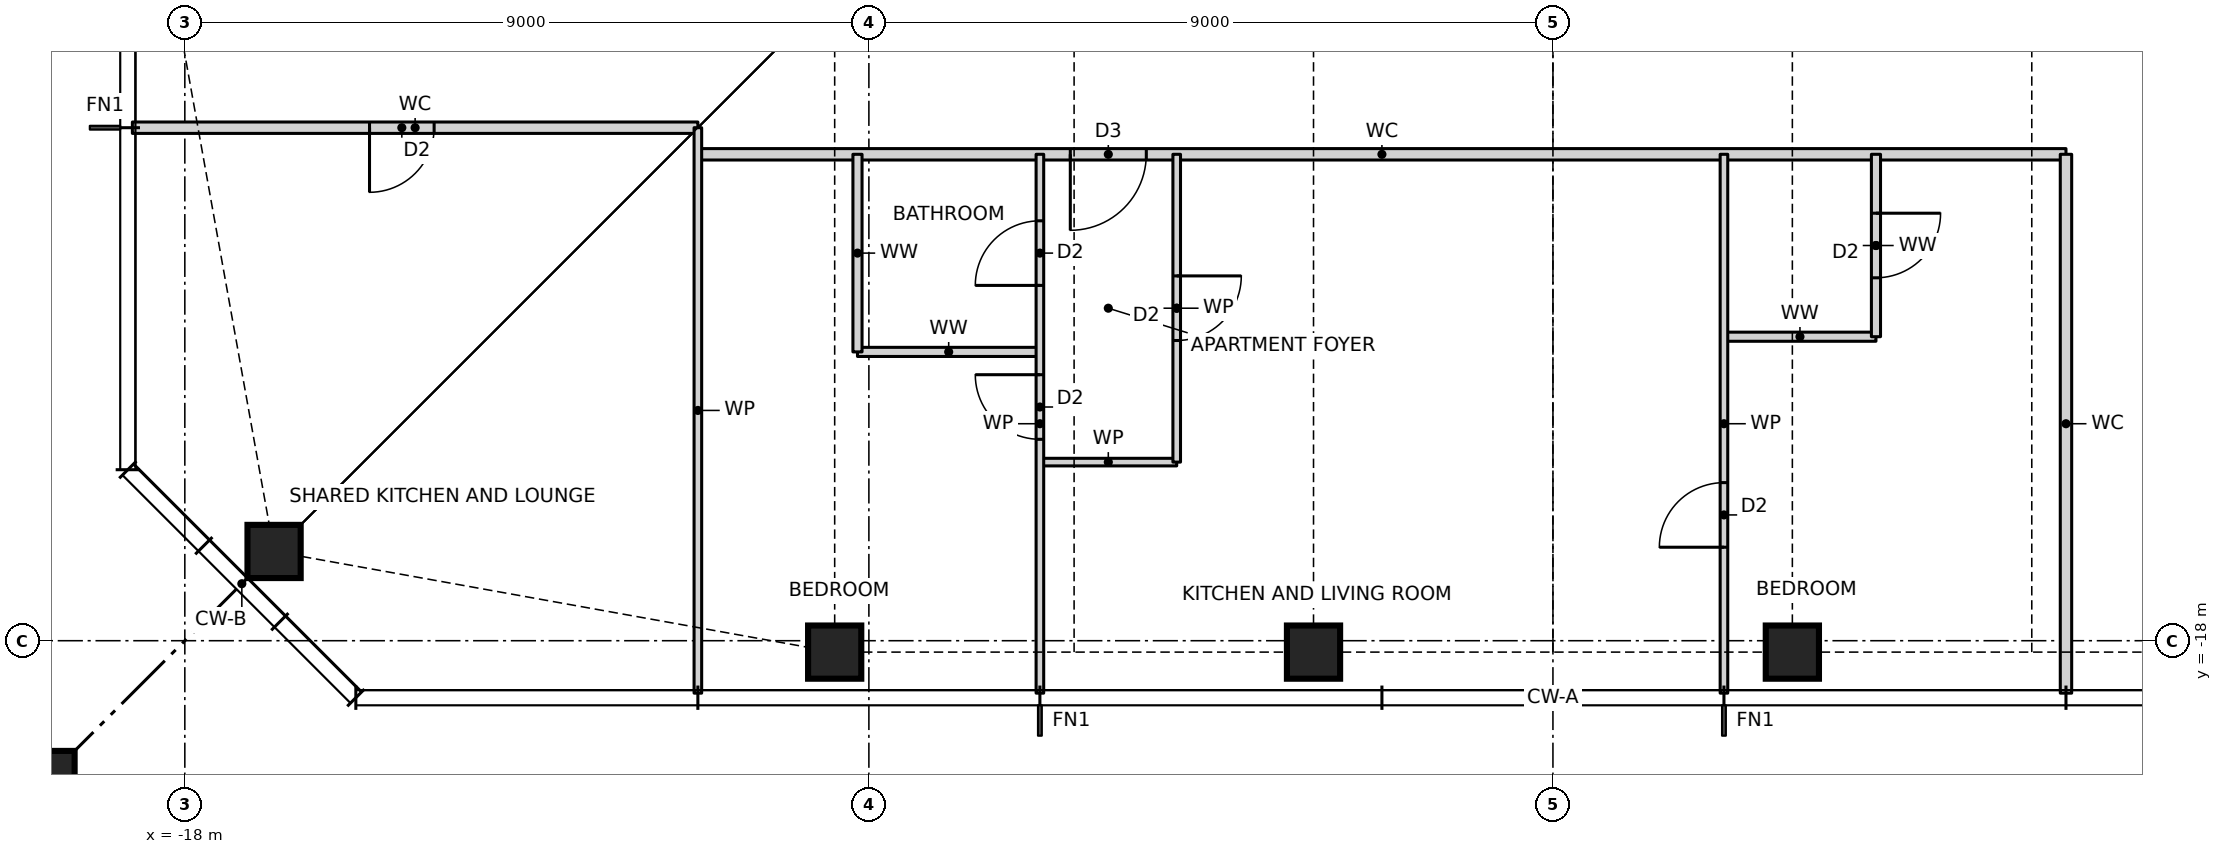
"""IFC4 building model, lengths in metres.
Left out: names, types, materials, properties, quantities, classifications, styles, units other than length and angle.
Written with IfcOpenShell. Run it as: python <this file> out.ifc"""

import sys

from ifc_helpers import new_model, si_unit, direction, frame, frame_2d, origin, origin_2d, place, context, subcontext, project, spatial, rectangle, hollow_rectangle, i_section, extrude, element, fill, save


model = new_model("IFC4")
c1 = context("Model", 3, precision=1e-05, world=origin(), true_north=direction((0.0, 1.0)))
c2 = subcontext(c1, "Body", "Model", "MODEL_VIEW")
j1 = project(units=[si_unit("LENGTHUNIT", "METRE"), si_unit("PLANEANGLEUNIT", "RADIAN")], contexts=[c1])
p1 = place(None, origin())
s1 = spatial("IfcSite", under=j1, at=p1, CompositionType="ELEMENT")
p2 = place(p1, origin())
s2 = spatial("IfcBuilding", under=s1, at=p2, CompositionType="ELEMENT")
p3 = place(p2, frame((0.0, 0.0, 181.0)))
s3 = spatial("IfcBuildingStorey", under=s2, at=p3, CompositionType="ELEMENT", Elevation=181.0)
for number, where, z_axis, x_axis in (
    (1, (-16.826, -16.826, 0.0), (0.0, 0.0, 1.0), (1.0, 0.0, 0.0)),
    (2, (-9.45, -18.15, 0.0), (0.0, 0.0, 1.0), (1.0, 0.0, 0.0)),
    (3, (-3.15, -18.15, 0.0), (0.0, 0.0, 1.0), (1.0, 0.0, 0.0)),
    (4, (3.15, -18.15, 0.0), (0.0, 0.0, 1.0), (1.0, 0.0, 0.0)),
):
    element("IfcColumn", number, at=place(p3, frame(where, z_axis=z_axis, x_axis=x_axis)), inside=s3, PredefinedType="COLUMN", context=c2, shape_type="SweptSolid", body=[
        extrude(hollow_rectangle(XDim=0.7, YDim=0.7, WallThickness=0.06, at=origin_2d()), origin(), (0.0, 0.0, 1.0), 3.5),
    ])
p4 = place(p3, frame((-21.65, -21.65, 0.0), z_axis=(0.0, 0.0, 1.0), x_axis=(1.0, 0.0, 0.0)))
e5 = element("IfcColumn", 5, at=p4, inside=s3, PredefinedType="COLUMN", context=c2, shape_type="SweptSolid", body=[
    extrude(rectangle(XDim=4.4, YDim=4.4, at=origin_2d()), origin(), (0.0, 0.0, 1.0), 3.5),
    extrude(i_section(OverallWidth=0.478, OverallDepth=0.599, WebThickness=0.1, FlangeThickness=0.14, at=origin_2d()), origin(), (0.0, 0.0, 1.0), 3.5),
])
p5 = place(p3, frame((-6.75, -15.65, 0.0), z_axis=(0.0, 0.0, 1.0), x_axis=(1.0, 0.0, 0.0)))
e6 = element("IfcWall", 6, at=p5, inside=s3, PredefinedType="PARTITIONING", context=c2, shape_type="SweptSolid", body=[
    extrude(rectangle(XDim=1.8, YDim=0.1, at=frame_2d((0.9, 0.0))), origin(), (0.0, 0.0, 1.0), 3.27),
])
p6 = place(p3, frame((-9.15, -14.2, 0.0), z_axis=(0.0, 0.0, 1.0), x_axis=(1.0, 0.0, 0.0)))
e7 = element("IfcWall", 7, at=p6, inside=s3, PredefinedType="PARTITIONING", context=c2, shape_type="SweptSolid", body=[
    extrude(rectangle(XDim=2.4, YDim=0.12, at=frame_2d((1.2, 0.0))), origin(), (0.0, 0.0, 1.0), 3.27),
])
p7 = place(p3, frame((2.25, -14.0, 0.0), z_axis=(0.0, 0.0, 1.0), x_axis=(1.0, 0.0, 0.0)))
e8 = element("IfcWall", 8, at=p7, inside=s3, PredefinedType="PARTITIONING", context=c2, shape_type="SweptSolid", body=[
    extrude(rectangle(XDim=2.0, YDim=0.12, at=frame_2d((1.0, 0.0))), origin(), (0.0, 0.0, 1.0), 3.27),
])
p8 = place(p3, frame((-11.25, -11.6, 0.0), z_axis=(0.0, 0.0, 1.0), x_axis=(1.0, 0.0, 0.0)))
e9 = element("IfcWall", 9, at=p8, inside=s3, PredefinedType="PARTITIONING", context=c2, shape_type="SweptSolid", body=[
    extrude(rectangle(XDim=18.0, YDim=0.15, at=frame_2d((9.0, 0.0))), origin(), (0.0, 0.0, 1.0), 3.27),
])
p9 = place(p8, frame((4.9, 0.0, 0.0)))
e10 = element("IfcOpeningElement", 10, at=p9, cuts=e9, PredefinedType="OPENING", context=c2, shape_type="SweptSolid", body=[
    extrude(rectangle(XDim=1.0, YDim=2.1, at=frame_2d((0.5, 1.05))), frame((0.0, 0.085, 0.0), z_axis=(0.0, -1.0, 0.0), x_axis=(1.0, 0.0, 0.0)), (0.0, 0.0, 1.0), 0.17),
])
p10 = place(p3, frame((-18.69, -11.25, 0.0), z_axis=(0.0, 0.0, 1.0), x_axis=(1.0, 0.0, 0.0)))
e11 = element("IfcWall", 11, at=p10, inside=s3, PredefinedType="PARTITIONING", context=c2, shape_type="SweptSolid", body=[
    extrude(rectangle(XDim=7.44, YDim=0.15, at=frame_2d((3.72, 0.0))), origin(), (0.0, 0.0, 1.0), 3.27),
])
p11 = place(p10, frame((3.12, 0.0, 0.0)))
e12 = element("IfcOpeningElement", 12, at=p11, cuts=e11, PredefinedType="OPENING", context=c2, shape_type="SweptSolid", body=[
    extrude(rectangle(XDim=0.85, YDim=2.1, at=frame_2d((0.425, 1.05))), frame((0.0, 0.085, 0.0), z_axis=(0.0, -1.0, 0.0), x_axis=(1.0, 0.0, 0.0)), (0.0, 0.0, 1.0), 0.17),
])
p12 = place(p3, frame((6.75, -18.69, 0.0), z_axis=(0.0, 0.0, 1.0), x_axis=(0.0, 1.0, 0.0)))
e13 = element("IfcWall", 13, at=p12, inside=s3, PredefinedType="PARTITIONING", context=c2, shape_type="SweptSolid", body=[
    extrude(rectangle(XDim=7.09, YDim=0.15, at=frame_2d((3.545, 0.0))), origin(), (0.0, 0.0, 1.0), 3.27),
])
p13 = place(p3, frame((4.25, -14.0, 0.0), z_axis=(0.0, 0.0, 1.0), x_axis=(0.0, 1.0, 0.0)))
e14 = element("IfcWall", 14, at=p13, inside=s3, PredefinedType="PARTITIONING", context=c2, shape_type="SweptSolid", body=[
    extrude(rectangle(XDim=2.4, YDim=0.12, at=frame_2d((1.2, 0.0))), origin(), (0.0, 0.0, 1.0), 3.27),
])
p14 = place(p13, frame((0.775, 0.0, 0.0)))
e15 = element("IfcOpeningElement", 15, at=p14, cuts=e14, PredefinedType="OPENING", context=c2, shape_type="SweptSolid", body=[
    extrude(rectangle(XDim=0.85, YDim=2.1, at=frame_2d((0.425, 1.05))), frame((0.0, 0.07, 0.0), z_axis=(0.0, -1.0, 0.0), x_axis=(1.0, 0.0, 0.0)), (0.0, 0.0, 1.0), 0.14),
])
p15 = place(p3, frame((2.25, -18.69, 0.0), z_axis=(0.0, 0.0, 1.0), x_axis=(0.0, 1.0, 0.0)))
e16 = element("IfcWall", 16, at=p15, inside=s3, PredefinedType="PARTITIONING", context=c2, shape_type="SweptSolid", body=[
    extrude(rectangle(XDim=7.09, YDim=0.1, at=frame_2d((3.545, 0.0))), origin(), (0.0, 0.0, 1.0), 3.27),
])
p16 = place(p15, frame((1.92, 0.0, 0.0)))
e17 = element("IfcOpeningElement", 17, at=p16, cuts=e16, PredefinedType="OPENING", context=c2, shape_type="SweptSolid", body=[
    extrude(rectangle(XDim=0.85, YDim=2.1, at=frame_2d((0.425, 1.05))), frame((0.0, 0.06, 0.0), z_axis=(0.0, -1.0, 0.0), x_axis=(1.0, 0.0, 0.0)), (0.0, 0.0, 1.0), 0.12),
])
p17 = place(p3, frame((-4.95, -15.65, 0.0), z_axis=(0.0, 0.0, 1.0), x_axis=(0.0, 1.0, 0.0)))
e18 = element("IfcWall", 18, at=p17, inside=s3, PredefinedType="PARTITIONING", context=c2, shape_type="SweptSolid", body=[
    extrude(rectangle(XDim=4.05, YDim=0.1, at=frame_2d((2.025, 0.0))), origin(), (0.0, 0.0, 1.0), 3.27),
])
p18 = place(p17, frame((1.6, 0.0, 0.0)))
e19 = element("IfcOpeningElement", 19, at=p18, cuts=e18, PredefinedType="OPENING", context=c2, shape_type="SweptSolid", body=[
    extrude(rectangle(XDim=0.85, YDim=2.1, at=frame_2d((0.425, 1.05))), frame((0.0, 0.06, 0.0), z_axis=(0.0, -1.0, 0.0), x_axis=(1.0, 0.0, 0.0)), (0.0, 0.0, 1.0), 0.12),
])
p19 = place(p3, frame((-6.75, -18.69, 0.0), z_axis=(0.0, 0.0, 1.0), x_axis=(0.0, 1.0, 0.0)))
e20 = element("IfcWall", 20, at=p19, inside=s3, PredefinedType="PARTITIONING", context=c2, shape_type="SweptSolid", body=[
    extrude(rectangle(XDim=7.09, YDim=0.1, at=frame_2d((3.545, 0.0))), origin(), (0.0, 0.0, 1.0), 3.27),
])
p20 = place(p19, frame((3.34, 0.0, 0.0)))
e21 = element("IfcOpeningElement", 21, at=p20, cuts=e20, PredefinedType="OPENING", context=c2, shape_type="SweptSolid", body=[
    extrude(rectangle(XDim=0.85, YDim=2.1, at=frame_2d((0.425, 1.05))), frame((0.0, 0.06, 0.0), z_axis=(0.0, -1.0, 0.0), x_axis=(1.0, 0.0, 0.0)), (0.0, 0.0, 1.0), 0.12),
])
p21 = place(p19, frame((5.365, 0.0, 0.0)))
e22 = element("IfcOpeningElement", 22, at=p21, cuts=e20, PredefinedType="OPENING", context=c2, shape_type="SweptSolid", body=[
    extrude(rectangle(XDim=0.85, YDim=2.1, at=frame_2d((0.425, 1.05))), frame((0.0, 0.06, 0.0), z_axis=(0.0, -1.0, 0.0), x_axis=(1.0, 0.0, 0.0)), (0.0, 0.0, 1.0), 0.12),
])
p22 = place(p3, frame((-9.15, -14.2, 0.0), z_axis=(0.0, 0.0, 1.0), x_axis=(0.0, 1.0, 0.0)))
e23 = element("IfcWall", 23, at=p22, inside=s3, PredefinedType="PARTITIONING", context=c2, shape_type="SweptSolid", body=[
    extrude(rectangle(XDim=2.6, YDim=0.12, at=frame_2d((1.3, 0.0))), origin(), (0.0, 0.0, 1.0), 3.27),
])
p23 = place(p3, frame((-11.25, -18.69, 0.0), z_axis=(0.0, 0.0, 1.0), x_axis=(0.0, 1.0, 0.0)))
e24 = element("IfcWall", 24, at=p23, inside=s3, PredefinedType="PARTITIONING", context=c2, shape_type="SweptSolid", body=[
    extrude(rectangle(XDim=7.44, YDim=0.1, at=frame_2d((3.72, 0.0))), origin(), (0.0, 0.0, 1.0), 3.27),
])
p24 = place(p9, frame((1.0, 0.0, 0.0), z_axis=(0.0, 0.0, 1.0), x_axis=(-1.0, 0.0, 0.0)))
e25 = element("IfcDoor", 25, at=p24, inside=s3, OperationType="SINGLE_SWING_RIGHT", PredefinedType="DOOR", context=c2, shape_type="SweptSolid", body=[
    extrude(rectangle(XDim=1.0, YDim=2.1, at=frame_2d((0.5, 1.05))), frame((0.0, 0.025, 0.0), z_axis=(0.0, -1.0, 0.0), x_axis=(1.0, 0.0, 0.0)), (0.0, 0.0, 1.0), 0.05),
])
fill(e10, e25)
p25 = place(p18, frame((0.85, 0.0, 0.0), z_axis=(0.0, 0.0, 1.0), x_axis=(-1.0, 0.0, 0.0)))
e26 = element("IfcDoor", 26, at=p25, inside=s3, OperationType="SINGLE_SWING_LEFT", PredefinedType="DOOR", context=c2, shape_type="SweptSolid", body=[
    extrude(rectangle(XDim=0.85, YDim=2.1, at=frame_2d((0.425, 1.05))), frame((0.0, 0.025, 0.0), z_axis=(0.0, -1.0, 0.0), x_axis=(1.0, 0.0, 0.0)), (0.0, 0.0, 1.0), 0.05),
])
fill(e19, e26)
p26 = place(p20, origin())
e27 = element("IfcDoor", 27, at=p26, inside=s3, OperationType="SINGLE_SWING_RIGHT", PredefinedType="DOOR", context=c2, shape_type="SweptSolid", body=[
    extrude(rectangle(XDim=0.85, YDim=2.1, at=frame_2d((0.425, 1.05))), frame((0.0, 0.025, 0.0), z_axis=(0.0, -1.0, 0.0), x_axis=(1.0, 0.0, 0.0)), (0.0, 0.0, 1.0), 0.05),
])
fill(e21, e27)
p27 = place(p21, origin())
e28 = element("IfcDoor", 28, at=p27, inside=s3, OperationType="SINGLE_SWING_LEFT", PredefinedType="DOOR", context=c2, shape_type="SweptSolid", body=[
    extrude(rectangle(XDim=0.85, YDim=2.1, at=frame_2d((0.425, 1.05))), frame((0.0, 0.025, 0.0), z_axis=(0.0, -1.0, 0.0), x_axis=(1.0, 0.0, 0.0)), (0.0, 0.0, 1.0), 0.05),
])
fill(e22, e28)
p28 = place(p16, origin())
e29 = element("IfcDoor", 29, at=p28, inside=s3, OperationType="SINGLE_SWING_LEFT", PredefinedType="DOOR", context=c2, shape_type="SweptSolid", body=[
    extrude(rectangle(XDim=0.85, YDim=2.1, at=frame_2d((0.425, 1.05))), frame((0.0, 0.025, 0.0), z_axis=(0.0, -1.0, 0.0), x_axis=(1.0, 0.0, 0.0)), (0.0, 0.0, 1.0), 0.05),
])
fill(e17, e29)
p29 = place(p14, frame((0.85, 0.0, 0.0), z_axis=(0.0, 0.0, 1.0), x_axis=(-1.0, 0.0, 0.0)))
e30 = element("IfcDoor", 30, at=p29, inside=s3, OperationType="SINGLE_SWING_LEFT", PredefinedType="DOOR", context=c2, shape_type="SweptSolid", body=[
    extrude(rectangle(XDim=0.85, YDim=2.1, at=frame_2d((0.425, 1.05))), frame((0.0, 0.025, 0.0), z_axis=(0.0, -1.0, 0.0), x_axis=(1.0, 0.0, 0.0)), (0.0, 0.0, 1.0), 0.05),
])
fill(e15, e30)
p30 = place(p11, frame((0.85, 0.0, 0.0), z_axis=(0.0, 0.0, 1.0), x_axis=(-1.0, 0.0, 0.0)))
e31 = element("IfcDoor", 31, at=p30, inside=s3, OperationType="SINGLE_SWING_RIGHT", PredefinedType="DOOR", context=c2, shape_type="SweptSolid", body=[
    extrude(rectangle(XDim=0.85, YDim=2.1, at=frame_2d((0.425, 1.05))), frame((0.0, 0.025, 0.0), z_axis=(0.0, -1.0, 0.0), x_axis=(1.0, 0.0, 0.0)), (0.0, 0.0, 1.0), 0.05),
])
fill(e12, e31)
save(model, sys.argv[1])
